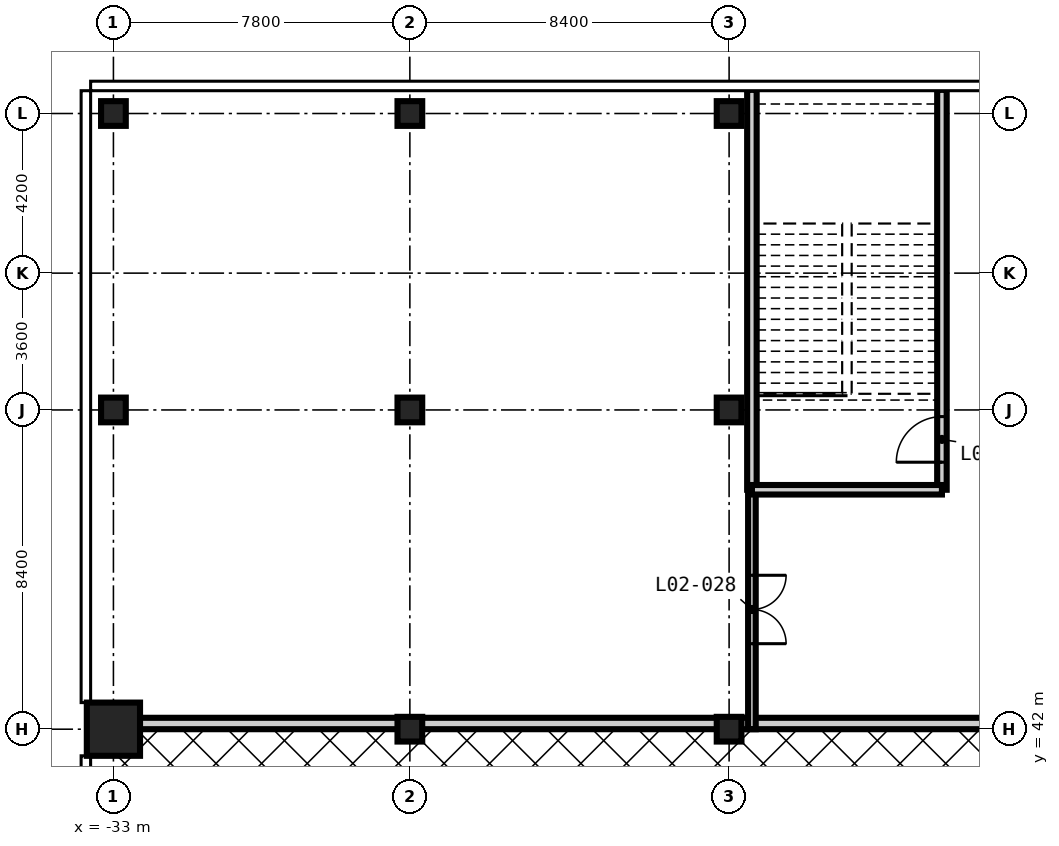
"""IFC4 building model, lengths in metres.
Left out: names, types, materials, properties, quantities, classifications, styles, units other than length and angle.
Written with IfcOpenShell. Run it as: python <this file> out.ifc"""

import sys

from ifc_helpers import new_model, si_unit, direction, frame, frame_2d, origin, origin_2d, place, context, subcontext, project, spatial, rectangle, extrude, element, fill, save


model = new_model("IFC4")
c1 = context("Model", 3, precision=1e-05, world=origin(), true_north=direction((0.0, 1.0)))
c2 = subcontext(c1, "Body", "Model", "MODEL_VIEW")
j1 = project(units=[si_unit("LENGTHUNIT", "METRE"), si_unit("PLANEANGLEUNIT", "RADIAN")], contexts=[c1])
p1 = place(None, origin())
s1 = spatial("IfcSite", under=j1, at=p1, CompositionType="ELEMENT")
p2 = place(p1, origin())
s2 = spatial("IfcBuilding", under=s1, at=p2, CompositionType="ELEMENT")
p3 = place(p2, frame((0.0, 0.0, 12.0)))
s3 = spatial("IfcBuildingStorey", under=s2, at=p3, CompositionType="ELEMENT", Elevation=12.0)
p4 = place(p3, frame((-33.0, 42.0, -0.3), z_axis=(0.0, 0.0, 1.0), x_axis=(1.0, 0.0, 0.0)))
e1 = element("IfcColumn", 1, at=p4, inside=s3, PredefinedType="COLUMN", context=c2, shape_type="SweptSolid", body=[
    extrude(rectangle(XDim=1.4, YDim=1.4, at=origin_2d()), origin(), (0.0, 0.0, 1.0), 5.0),
])
for number, where, z_axis, x_axis in (
    (2, (-33.0, 50.4, -0.3), (0.0, 0.0, 1.0), (1.0, 0.0, 0.0)),
    (3, (-33.0, 58.2, -0.3), (0.0, 0.0, 1.0), (1.0, 0.0, 0.0)),
    (4, (-25.2, 42.0, -0.3), (0.0, 0.0, 1.0), (1.0, 0.0, 0.0)),
    (5, (-25.2, 50.4, -0.3), (0.0, 0.0, 1.0), (1.0, 0.0, 0.0)),
    (6, (-25.2, 58.2, -0.3), (0.0, 0.0, 1.0), (1.0, 0.0, 0.0)),
    (7, (-16.8, 42.0, -0.3), (0.0, 0.0, 1.0), (1.0, 0.0, 0.0)),
    (8, (-16.8, 50.4, -0.3), (0.0, 0.0, 1.0), (1.0, 0.0, 0.0)),
    (9, (-16.8, 58.2, -0.3), (0.0, 0.0, 1.0), (1.0, 0.0, 0.0)),
):
    element("IfcColumn", number, at=place(p3, frame(where, z_axis=z_axis, x_axis=x_axis)), inside=s3, PredefinedType="COLUMN", context=c2, shape_type="SweptSolid", body=[
        extrude(rectangle(XDim=0.65, YDim=0.65, at=origin_2d()), origin(), (0.0, 0.0, 1.0), 5.0),
    ])
p5 = place(p3, frame((-33.6, 42.15, 0.0), z_axis=(0.0, 0.0, 1.0), x_axis=(1.0, 0.0, 0.0)))
e10 = element("IfcWall", 10, at=p5, inside=s3, PredefinedType="PARTITIONING", context=c2, shape_type="SweptSolid", body=[
    extrude(rectangle(XDim=24.6, YDim=0.3, at=frame_2d((12.3, 0.0))), origin(), (0.0, 0.0, 1.0), 3.779),
])
p6 = place(p3, frame((-16.2, 48.3, 0.0), z_axis=(0.0, 0.0, 1.0), x_axis=(0.0, -1.0, 0.0)))
e11 = element("IfcWall", 11, at=p6, inside=s3, PredefinedType="PARTITIONING", context=c2, shape_type="SweptSolid", body=[
    extrude(rectangle(XDim=6.3, YDim=0.2, at=frame_2d((3.15, 0.0))), origin(), (0.0, 0.0, 1.0), 4.7),
])
p7 = place(p6, frame((2.25, 0.0, 0.0)))
e12 = element("IfcOpeningElement", 12, at=p7, cuts=e11, PredefinedType="OPENING", context=c2, shape_type="SweptSolid", body=[
    extrude(rectangle(XDim=1.8, YDim=2.4, at=frame_2d((0.9, 1.2))), frame((0.0, 0.11, 0.0), z_axis=(0.0, -1.0, 0.0), x_axis=(1.0, 0.0, 0.0)), (0.0, 0.0, 1.0), 0.22),
])
p8 = place(p3, frame((-16.2, 48.3, 0.0), z_axis=(0.0, 0.0, 1.0), x_axis=(0.0, 1.0, 0.0)))
e13 = element("IfcWall", 13, at=p8, inside=s3, PredefinedType="PARTITIONING", context=c2, shape_type="SweptSolid", body=[
    extrude(rectangle(XDim=10.523, YDim=0.25, at=frame_2d((5.261, 0.0))), origin(), (0.0, 0.0, 1.0), 4.7),
])
p9 = place(p3, frame((-11.2, 48.3, 0.0), z_axis=(0.0, 0.0, 1.0), x_axis=(0.0, 1.0, 0.0)))
e14 = element("IfcWall", 14, at=p9, inside=s3, PredefinedType="PARTITIONING", context=c2, shape_type="SweptSolid", body=[
    extrude(rectangle(XDim=10.523, YDim=0.25, at=frame_2d((5.261, 0.0))), origin(), (0.0, 0.0, 1.0), 4.7),
])
p10 = place(p9, frame((0.725, 0.0, 0.0)))
e15 = element("IfcOpeningElement", 15, at=p10, cuts=e14, PredefinedType="OPENING", context=c2, shape_type="SweptSolid", body=[
    extrude(rectangle(XDim=1.2, YDim=2.2, at=frame_2d((0.6, 1.1))), frame((0.0, 0.135, 0.0), z_axis=(0.0, -1.0, 0.0), x_axis=(1.0, 0.0, 0.0)), (0.0, 0.0, 1.0), 0.27),
])
p11 = place(p3, frame((-16.2, 48.3, 0.0), z_axis=(0.0, 0.0, 1.0), x_axis=(1.0, 0.0, 0.0)))
e16 = element("IfcWall", 16, at=p11, inside=s3, PredefinedType="PARTITIONING", context=c2, shape_type="SweptSolid", body=[
    extrude(rectangle(XDim=5.0, YDim=0.25, at=frame_2d((2.5, 0.0))), origin(), (0.0, 0.0, 1.0), 4.7),
])
p12 = place(p10, origin())
e17 = element("IfcDoor", 17, at=p12, inside=s3, OperationType="SINGLE_SWING_LEFT", PredefinedType="DOOR", context=c2, shape_type="SweptSolid", body=[
    extrude(rectangle(XDim=1.2, YDim=2.2, at=frame_2d((0.6, 1.1))), frame((0.0, 0.025, 0.0), z_axis=(0.0, -1.0, 0.0), x_axis=(1.0, 0.0, 0.0)), (0.0, 0.0, 1.0), 0.05),
])
fill(e15, e17)
p13 = place(p7, origin())
e18 = element("IfcDoor", 18, at=p13, inside=s3, OperationType="DOUBLE_DOOR_DOUBLE_SWING", PredefinedType="DOOR", context=c2, shape_type="SweptSolid", body=[
    extrude(rectangle(XDim=1.8, YDim=2.4, at=frame_2d((0.9, 1.2))), frame((0.0, 0.025, 0.0), z_axis=(0.0, -1.0, 0.0), x_axis=(1.0, 0.0, 0.0)), (0.0, 0.0, 1.0), 0.05),
])
fill(e12, e18)
save(model, sys.argv[1])
